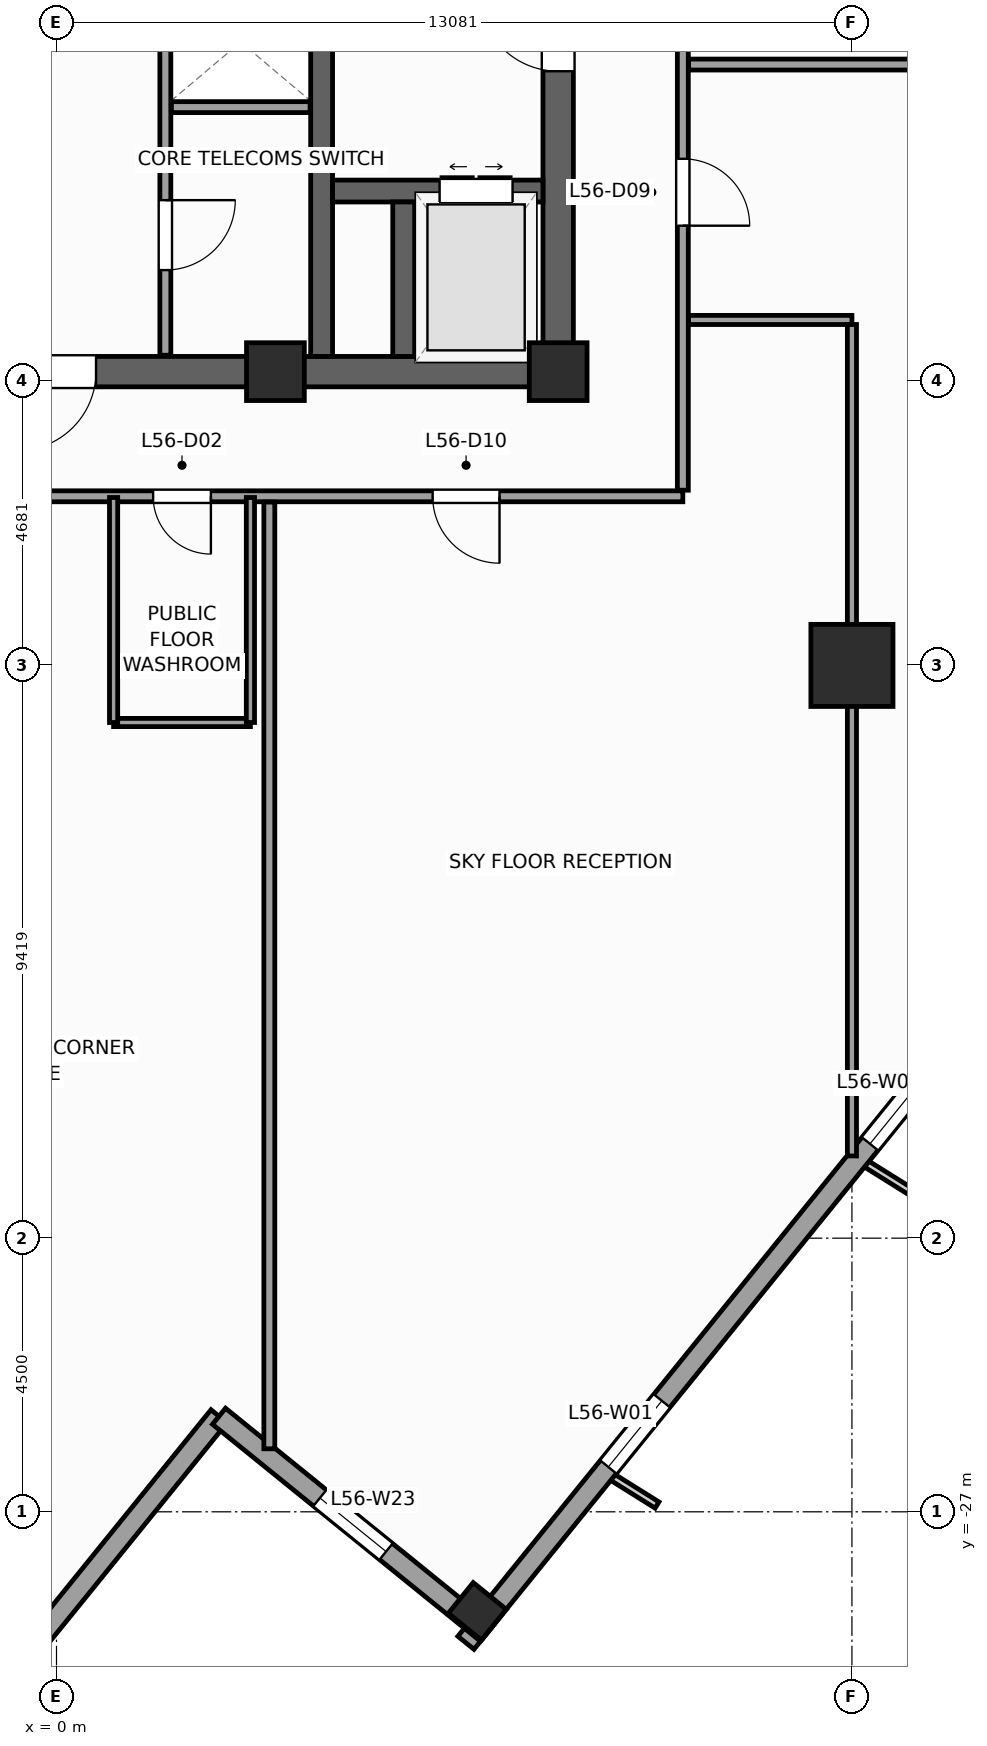
"""IFC4 building model, lengths in metres.
Left out: names, types, materials, properties, quantities, classifications, styles, units other than length and angle.
Written with IfcOpenShell. Run it as: python <this file> out.ifc"""

import sys

from ifc_helpers import new_model, si_unit, direction, frame, frame_2d, origin, origin_2d, place, context, subcontext, project, spatial, rectangle, extrude, source, transform, mapped, element, fill, save


model = new_model("IFC4")
c1 = context("Model", 3, precision=1e-05, world=origin(), true_north=direction((0.0, 1.0)))
c2 = subcontext(c1, "Body", "Model", "MODEL_VIEW")
j1 = project(units=[si_unit("LENGTHUNIT", "METRE"), si_unit("PLANEANGLEUNIT", "RADIAN")], contexts=[c1])
p1 = place(None, origin())
s1 = spatial("IfcSite", under=j1, at=p1, CompositionType="ELEMENT")
p2 = place(p1, origin())
s2 = spatial("IfcBuilding", under=s1, at=p2, CompositionType="ELEMENT")
p3 = place(p2, frame((0.0, 0.0, 232.9)))
s3 = spatial("IfcBuildingStorey", under=s2, at=p3, CompositionType="ELEMENT", Elevation=232.9)
p4 = place(p3, frame((-8.5, -8.25, 0.0), z_axis=(0.0, 0.0, 1.0), x_axis=(1.0, 0.0, 0.0)))
e1 = element("IfcWall", 1, at=p4, inside=s3, PredefinedType="SHEAR", context=c2, shape_type="SweptSolid", body=[
    extrude(rectangle(XDim=17.0, YDim=0.5, at=frame_2d((8.5, 0.0))), origin(), (0.0, 0.0, 1.0), 3.9),
])
p5 = place(p4, frame((7.85, 0.0, 0.0)))
e2 = element("IfcOpeningElement", 2, at=p5, cuts=e1, PredefinedType="OPENING", context=c2, shape_type="SweptSolid", body=[
    extrude(rectangle(XDim=1.3, YDim=2.2, at=frame_2d((0.65, 1.1))), frame((0.0, 0.26, 0.0), z_axis=(0.0, -1.0, 0.0), x_axis=(1.0, 0.0, 0.0)), (0.0, 0.0, 1.0), 0.52),
])
p6 = place(p3, frame((8.25, -8.0, 0.0), z_axis=(0.0, 0.0, 1.0), x_axis=(0.0, 1.0, 0.0)))
e3 = element("IfcWall", 3, at=p6, inside=s3, PredefinedType="SHEAR", context=c2, shape_type="SweptSolid", body=[
    extrude(rectangle(XDim=16.0, YDim=0.5, at=frame_2d((8.0, 0.0))), origin(), (0.0, 0.0, 1.0), 3.9),
])
p7 = place(p6, frame((4.69, 0.0, 0.0)))
e4 = element("IfcOpeningElement", 4, at=p7, cuts=e3, PredefinedType="OPENING", context=c2, shape_type="SweptSolid", body=[
    extrude(rectangle(XDim=1.3, YDim=2.2, at=frame_2d((0.65, 1.1))), frame((0.0, 0.26, 0.0), z_axis=(0.0, -1.0, 0.0), x_axis=(1.0, 0.0, 0.0)), (0.0, 0.0, 1.0), 0.52),
])
p8 = place(p3, frame((4.36, -8.0, 0.0), z_axis=(0.0, 0.0, 1.0), x_axis=(0.0, 1.0, 0.0)))
e5 = element("IfcWall", 5, at=p8, inside=s3, PredefinedType="SHEAR", context=c2, shape_type="SweptSolid", body=[
    extrude(rectangle(XDim=16.0, YDim=0.36, at=frame_2d((8.0, 0.0))), origin(), (0.0, 0.0, 1.0), 3.9),
])
p9 = place(p3, frame((4.54, -5.28, 0.0), z_axis=(0.0, 0.0, 1.0), x_axis=(1.0, 0.0, 0.0)))
e6 = element("IfcWall", 6, at=p9, inside=s3, PredefinedType="SHEAR", context=c2, shape_type="SweptSolid", body=[
    extrude(rectangle(XDim=3.46, YDim=0.36, at=frame_2d((1.73, 0.0))), origin(), (0.0, 0.0, 1.0), 3.9),
])
p10 = place(p9, frame((1.76, 0.0, 0.0)))
e7 = element("IfcOpeningElement", 7, at=p10, cuts=e6, PredefinedType="OPENING", context=c2, shape_type="SweptSolid", body=[
    extrude(rectangle(XDim=1.2, YDim=2.25, at=frame_2d((0.6, 1.125))), frame((0.0, 0.19, 0.0), z_axis=(0.0, -1.0, 0.0), x_axis=(1.0, 0.0, 0.0)), (0.0, 0.0, 1.0), 0.38),
])
p11 = place(p3, frame((5.71, -8.0, 0.0), z_axis=(0.0, 0.0, 1.0), x_axis=(0.0, 1.0, 0.0)))
e8 = element("IfcWall", 8, at=p11, inside=s3, PredefinedType="SHEAR", context=c2, shape_type="SweptSolid", body=[
    extrude(rectangle(XDim=2.54, YDim=0.36, at=frame_2d((1.27, 0.0))), origin(), (0.0, 0.0, 1.0), 3.9),
])
m1 = source(origin(), c2, "Body", "SweptSolid", [
    extrude(rectangle(XDim=0.95, YDim=0.95, at=origin_2d()), origin(), (0.0, 0.0, 1.0), 3.9),
])
for number, where, z_axis, x_axis in (
    (9, (8.25, -8.25, 0.0), (0.0, 0.0, 1.0), (1.0, 0.0, 0.0)),
    (10, (3.6, -8.25, 0.0), (0.0, 0.0, 1.0), (1.0, 0.0, 0.0)),
):
    element("IfcColumn", number, at=place(p3, frame(where, z_axis=z_axis, x_axis=x_axis)), inside=s3, PredefinedType="PILASTER", context=c2, shape_type="MappedRepresentation", body=[
        mapped(m1, transform((0.0, 0.0, 0.0), scale=1.0)),
    ])
m2 = source(origin(), c2, "Body", "SweptSolid", [
    extrude(rectangle(XDim=1.35, YDim=1.35, at=origin_2d()), origin(), (0.0, 0.0, 1.0), 3.9),
])
p12 = place(p3, frame((13.081, -13.081, 0.0), z_axis=(0.0, 0.0, 1.0), x_axis=(1.0, 0.0, 0.0)))
e11 = element("IfcColumn", 11, at=p12, inside=s3, PredefinedType="COLUMN", context=c2, shape_type="MappedRepresentation", body=[
    mapped(m2, transform((0.0, 0.0, 0.0), scale=1.0)),
])
m3 = source(origin(), c2, "Body", "SweptSolid", [
    extrude(rectangle(XDim=0.65, YDim=0.7, at=origin_2d()), origin(), (0.0, 0.0, 1.0), 3.9),
])
p13 = place(p3, frame((6.92, -28.637, 0.0), z_axis=(0.0, 0.0, 1.0), x_axis=(0.62932039105, 0.777145961457, 0.0)))
e12 = element("IfcColumn", 12, at=p13, inside=s3, PredefinedType="COLUMN", context=c2, shape_type="MappedRepresentation", body=[
    mapped(m3, transform((0.0, 0.0, 0.0), scale=1.0)),
])
p14 = place(p3, frame((6.733, -29.154, 0.0), z_axis=(0.0, 0.0, 1.0), x_axis=(0.629325378072, 0.77714192302, 0.0)))
e13 = element("IfcWall", 13, at=p14, inside=s3, PredefinedType="STANDARD", context=c2, shape_type="SweptSolid", body=[
    extrude(rectangle(XDim=36.84, YDim=0.34, at=frame_2d((18.42, 0.0))), origin(), (0.0, 0.0, 1.0), 2.96),
])
p15 = place(p14, frame((23.495, 0.0, 0.0)))
e14 = element("IfcOpeningElement", 14, at=p15, cuts=e13, PredefinedType="OPENING", context=c2, shape_type="SweptSolid", body=[
    extrude(rectangle(XDim=1.05, YDim=2.25, at=frame_2d((0.525, 1.125))), frame((0.0, 0.18, 0.0), z_axis=(0.0, -1.0, 0.0), x_axis=(1.0, 0.0, 0.0)), (0.0, 0.0, 1.0), 0.36),
])
p16 = place(p14, frame((3.721, 0.0, 0.48)))
e15 = element("IfcOpeningElement", 15, at=p16, cuts=e13, PredefinedType="OPENING", context=c2, shape_type="SweptSolid", body=[
    extrude(rectangle(XDim=1.4, YDim=2.4, at=frame_2d((0.7, 1.2))), frame((0.0, 0.18, 0.0), z_axis=(0.0, -1.0, 0.0), x_axis=(1.0, 0.0, 0.0)), (0.0, 0.0, 1.0), 0.36),
])
p17 = place(p14, frame((10.559, 0.0, 0.58)))
e16 = element("IfcOpeningElement", 16, at=p17, cuts=e13, PredefinedType="OPENING", context=c2, shape_type="SweptSolid", body=[
    extrude(rectangle(XDim=1.75, YDim=2.3, at=frame_2d((0.875, 1.15))), frame((0.0, 0.18, 0.0), z_axis=(0.0, -1.0, 0.0), x_axis=(1.0, 0.0, 0.0)), (0.0, 0.0, 1.0), 0.36),
])
p18 = place(p14, frame((16.058, 0.0, 0.58)))
e17 = element("IfcOpeningElement", 17, at=p18, cuts=e13, PredefinedType="OPENING", context=c2, shape_type="SweptSolid", body=[
    extrude(rectangle(XDim=1.75, YDim=2.3, at=frame_2d((0.875, 1.15))), frame((0.0, 0.18, 0.0), z_axis=(0.0, -1.0, 0.0), x_axis=(1.0, 0.0, 0.0)), (0.0, 0.0, 1.0), 0.36),
])
p19 = place(p14, frame((25.676, 0.0, 0.58)))
e18 = element("IfcOpeningElement", 18, at=p19, cuts=e13, PredefinedType="OPENING", context=c2, shape_type="SweptSolid", body=[
    extrude(rectangle(XDim=1.75, YDim=2.3, at=frame_2d((0.875, 1.15))), frame((0.0, 0.18, 0.0), z_axis=(0.0, -1.0, 0.0), x_axis=(1.0, 0.0, 0.0)), (0.0, 0.0, 1.0), 0.36),
])
p20 = place(p14, frame((30.982, 0.0, 0.48)))
e19 = element("IfcOpeningElement", 19, at=p20, cuts=e13, PredefinedType="OPENING", context=c2, shape_type="SweptSolid", body=[
    extrude(rectangle(XDim=1.4, YDim=2.4, at=frame_2d((0.7, 1.2))), frame((0.0, 0.18, 0.0), z_axis=(0.0, -1.0, 0.0), x_axis=(1.0, 0.0, 0.0)), (0.0, 0.0, 1.0), 0.36),
])
p21 = place(p3, frame((-0.789, -29.703, 0.0), z_axis=(0.0, 0.0, 1.0), x_axis=(0.629323365087, 0.77714355312, 0.0)))
e20 = element("IfcWall", 20, at=p21, inside=s3, PredefinedType="STANDARD", context=c2, shape_type="SweptSolid", body=[
    extrude(rectangle(XDim=5.5, YDim=0.34, at=frame_2d((2.75, 0.0))), origin(), (0.0, 0.0, 1.0), 3.66),
])
p22 = place(p3, frame((2.673, -25.429, 0.0), z_axis=(0.0, 0.0, 1.0), x_axis=(0.777162640055, -0.629299794138, 0.0)))
e21 = element("IfcWall", 21, at=p22, inside=s3, PredefinedType="STANDARD", context=c2, shape_type="SweptSolid", body=[
    extrude(rectangle(XDim=5.67, YDim=0.34, at=frame_2d((2.835, 0.0))), origin(), (0.0, 0.0, 1.0), 3.66),
])
p23 = place(p22, frame((2.135, 0.0, 0.48)))
e22 = element("IfcOpeningElement", 22, at=p23, cuts=e21, PredefinedType="OPENING", context=c2, shape_type="SweptSolid", body=[
    extrude(rectangle(XDim=1.4, YDim=2.4, at=frame_2d((0.7, 1.2))), frame((0.0, 0.18, 0.0), z_axis=(0.0, -1.0, 0.0), x_axis=(1.0, 0.0, 0.0)), (0.0, 0.0, 1.0), 0.36),
])
p24 = place(p3, frame((1.79, -7.98, 0.0), z_axis=(0.0, 0.0, 1.0), x_axis=(0.0, 1.0, 0.0)))
e23 = element("IfcWall", 23, at=p24, inside=s3, PredefinedType="PARTITIONING", context=c2, shape_type="SweptSolid", body=[
    extrude(rectangle(XDim=12.38, YDim=0.18, at=frame_2d((6.19, 0.0))), origin(), (0.0, 0.0, 1.0), 3.66),
])
p25 = place(p24, frame((8.8, 0.0, 0.0)))
e24 = element("IfcOpeningElement", 24, at=p25, cuts=e23, PredefinedType="OPENING", context=c2, shape_type="SweptSolid", body=[
    extrude(rectangle(XDim=1.1, YDim=2.2, at=frame_2d((0.55, 1.1))), frame((0.0, 0.1, 0.0), z_axis=(0.0, -1.0, 0.0), x_axis=(1.0, 0.0, 0.0)), (0.0, 0.0, 1.0), 0.2),
])
p26 = place(p24, frame((10.86, 0.0, 0.0)))
e25 = element("IfcOpeningElement", 25, at=p26, cuts=e23, PredefinedType="OPENING", context=c2, shape_type="SweptSolid", body=[
    extrude(rectangle(XDim=1.1, YDim=2.2, at=frame_2d((0.55, 1.1))), frame((0.0, 0.1, 0.0), z_axis=(0.0, -1.0, 0.0), x_axis=(1.0, 0.0, 0.0)), (0.0, 0.0, 1.0), 0.2),
])
p27 = place(p24, frame((1.4, 0.0, 0.0)))
e26 = element("IfcOpeningElement", 26, at=p27, cuts=e23, PredefinedType="OPENING", context=c2, shape_type="SweptSolid", body=[
    extrude(rectangle(XDim=1.15, YDim=2.25, at=frame_2d((0.575, 1.125))), frame((0.0, 0.1, 0.0), z_axis=(0.0, -1.0, 0.0), x_axis=(1.0, 0.0, 0.0)), (0.0, 0.0, 1.0), 0.2),
])
p28 = place(p3, frame((1.89, -3.9, 0.0), z_axis=(0.0, 0.0, 1.0), x_axis=(1.0, 0.0, 0.0)))
e27 = element("IfcWall", 27, at=p28, inside=s3, PredefinedType="PARTITIONING", context=c2, shape_type="SweptSolid", body=[
    extrude(rectangle(XDim=2.28, YDim=0.18, at=frame_2d((1.14, 0.0))), origin(), (0.0, 0.0, 1.0), 3.66),
])
p29 = place(p3, frame((-11.4, -10.3, 0.0), z_axis=(0.0, 0.0, 1.0), x_axis=(1.0, 0.0, 0.0)))
e28 = element("IfcWall", 28, at=p29, inside=s3, PredefinedType="PARTITIONING", context=c2, shape_type="SweptSolid", body=[
    extrude(rectangle(XDim=21.7, YDim=0.18, at=frame_2d((10.85, 0.0))), origin(), (0.0, 0.0, 1.0), 3.66),
])
p30 = place(p29, frame((12.989, 0.0, 0.0)))
e29 = element("IfcOpeningElement", 29, at=p30, cuts=e28, PredefinedType="OPENING", context=c2, shape_type="SweptSolid", body=[
    extrude(rectangle(XDim=0.95, YDim=2.1, at=frame_2d((0.475, 1.05))), frame((0.0, 0.1, 0.0), z_axis=(0.0, -1.0, 0.0), x_axis=(1.0, 0.0, 0.0)), (0.0, 0.0, 1.0), 0.2),
])
p31 = place(p29, frame((17.585, 0.0, 0.0)))
e30 = element("IfcOpeningElement", 30, at=p31, cuts=e28, PredefinedType="OPENING", context=c2, shape_type="SweptSolid", body=[
    extrude(rectangle(XDim=1.1, YDim=2.2, at=frame_2d((0.55, 1.1))), frame((0.0, 0.1, 0.0), z_axis=(0.0, -1.0, 0.0), x_axis=(1.0, 0.0, 0.0)), (0.0, 0.0, 1.0), 0.2),
])
p32 = place(p29, frame((9.075, 0.0, 0.0)))
e31 = element("IfcOpeningElement", 31, at=p32, cuts=e28, PredefinedType="OPENING", context=c2, shape_type="SweptSolid", body=[
    extrude(rectangle(XDim=1.1, YDim=2.2, at=frame_2d((0.55, 1.1))), frame((0.0, 0.1, 0.0), z_axis=(0.0, -1.0, 0.0), x_axis=(1.0, 0.0, 0.0)), (0.0, 0.0, 1.0), 0.2),
])
p33 = place(p29, frame((3.724, 0.0, 0.0)))
e32 = element("IfcOpeningElement", 32, at=p33, cuts=e28, PredefinedType="OPENING", context=c2, shape_type="SweptSolid", body=[
    extrude(rectangle(XDim=1.1, YDim=2.2, at=frame_2d((0.55, 1.1))), frame((0.0, 0.1, 0.0), z_axis=(0.0, -1.0, 0.0), x_axis=(1.0, 0.0, 0.0)), (0.0, 0.0, 1.0), 0.2),
])
p34 = place(p3, frame((10.3, -10.2, 0.0), z_axis=(0.0, 0.0, 1.0), x_axis=(0.0, 1.0, 0.0)))
e33 = element("IfcWall", 33, at=p34, inside=s3, PredefinedType="PARTITIONING", context=c2, shape_type="SweptSolid", body=[
    extrude(rectangle(XDim=20.4, YDim=0.18, at=frame_2d((10.2, 0.0))), origin(), (0.0, 0.0, 1.0), 3.66),
])
p35 = place(p34, frame((14.95, 0.0, 0.0)))
e34 = element("IfcOpeningElement", 34, at=p35, cuts=e33, PredefinedType="OPENING", context=c2, shape_type="SweptSolid", body=[
    extrude(rectangle(XDim=1.1, YDim=2.2, at=frame_2d((0.55, 1.1))), frame((0.0, 0.1, 0.0), z_axis=(0.0, -1.0, 0.0), x_axis=(1.0, 0.0, 0.0)), (0.0, 0.0, 1.0), 0.2),
])
p36 = place(p34, frame((9.65, 0.0, 0.0)))
e35 = element("IfcOpeningElement", 35, at=p36, cuts=e33, PredefinedType="OPENING", context=c2, shape_type="SweptSolid", body=[
    extrude(rectangle(XDim=1.1, YDim=2.2, at=frame_2d((0.55, 1.1))), frame((0.0, 0.1, 0.0), z_axis=(0.0, -1.0, 0.0), x_axis=(1.0, 0.0, 0.0)), (0.0, 0.0, 1.0), 0.2),
])
p37 = place(p34, frame((4.35, 0.0, 0.0)))
e36 = element("IfcOpeningElement", 36, at=p37, cuts=e33, PredefinedType="OPENING", context=c2, shape_type="SweptSolid", body=[
    extrude(rectangle(XDim=1.1, YDim=2.2, at=frame_2d((0.55, 1.1))), frame((0.0, 0.1, 0.0), z_axis=(0.0, -1.0, 0.0), x_axis=(1.0, 0.0, 0.0)), (0.0, 0.0, 1.0), 0.2),
])
p38 = place(p3, frame((10.395, -3.2, 0.0), z_axis=(0.0, 0.0, 1.0), x_axis=(1.0, 0.0, 0.0)))
e37 = element("IfcWall", 37, at=p38, inside=s3, PredefinedType="PARTITIONING", context=c2, shape_type="SweptSolid", body=[
    extrude(rectangle(XDim=17.22, YDim=0.18, at=frame_2d((8.61, 0.0))), origin(), (0.0, 0.0, 1.0), 3.66),
])
p39 = place(p3, frame((3.5, -10.395, 0.0), z_axis=(0.0, 0.0, 1.0), x_axis=(0.0, -1.0, 0.0)))
e38 = element("IfcWall", 38, at=p39, inside=s3, PredefinedType="PARTITIONING", context=c2, shape_type="SweptSolid", body=[
    extrude(rectangle(XDim=15.569, YDim=0.18, at=frame_2d((7.784, 0.0))), origin(), (0.0, 0.0, 1.0), 3.66),
])
p40 = place(p3, frame((10.395, -7.4, 0.0), z_axis=(0.0, 0.0, 1.0), x_axis=(1.0, 0.0, 0.0)))
e39 = element("IfcWall", 39, at=p40, inside=s3, PredefinedType="PARTITIONING", context=c2, shape_type="SweptSolid", body=[
    extrude(rectangle(XDim=2.686, YDim=0.15, at=frame_2d((1.343, 0.0))), origin(), (0.0, 0.0, 1.0), 3.66),
])
p41 = place(p3, frame((13.081, -7.475, 0.0), z_axis=(0.0, 0.0, 1.0), x_axis=(0.0, -1.0, 0.0)))
e40 = element("IfcWall", 40, at=p41, inside=s3, PredefinedType="PARTITIONING", context=c2, shape_type="SweptSolid", body=[
    extrude(rectangle(XDim=13.673, YDim=0.15, at=frame_2d((6.837, 0.0))), origin(), (0.0, 0.0, 1.0), 2.76),
])
p42 = place(p3, frame((0.939, -14.02, 0.0), z_axis=(0.0, 0.0, 1.0), x_axis=(1.0, 0.0, 0.0)))
e41 = element("IfcWall", 41, at=p42, inside=s3, PredefinedType="PARTITIONING", context=c2, shape_type="SweptSolid", body=[
    extrude(rectangle(XDim=2.25, YDim=0.135, at=frame_2d((1.125, 0.0))), origin(), (0.0, 0.0, 1.0), 3.66),
])
for number, where, z_axis, x_axis in (
    (42, (3.189, -14.02, 0.0), (0.0, 0.0, 1.0), (0.0, 1.0, 0.0)),
    (43, (0.939, -14.02, 0.0), (0.0, 0.0, 1.0), (0.0, 1.0, 0.0)),
):
    element("IfcWall", number, at=place(p3, frame(where, z_axis=z_axis, x_axis=x_axis)), inside=s3, PredefinedType="PARTITIONING", context=c2, shape_type="SweptSolid", body=[
        extrude(rectangle(XDim=3.7, YDim=0.135, at=frame_2d((1.85, 0.0))), origin(), (0.0, 0.0, 1.0), 3.66),
    ])
m4 = source(origin(), c2, "Body", "SweptSolid", [
    extrude(rectangle(XDim=1.4, YDim=2.4, at=frame_2d((0.7, 1.2))), frame((0.0, 0.03, 0.0), z_axis=(0.0, -1.0, 0.0), x_axis=(1.0, 0.0, 0.0)), (0.0, 0.0, 1.0), 0.06),
])
p43 = place(p16, origin())
e44 = element("IfcWindow", 44, at=p43, inside=s3, PartitioningType="SINGLE_PANEL", PredefinedType="WINDOW", context=c2, shape_type="MappedRepresentation", body=[
    mapped(m4, transform((0.0, 0.0, 0.0), scale=1.0)),
])
fill(e15, e44)
m5 = source(origin(), c2, "Body", "SweptSolid", [
    extrude(rectangle(XDim=1.75, YDim=2.3, at=frame_2d((0.875, 1.15))), frame((0.0, 0.03, 0.0), z_axis=(0.0, -1.0, 0.0), x_axis=(1.0, 0.0, 0.0)), (0.0, 0.0, 1.0), 0.06),
])
p44 = place(p17, origin())
e45 = element("IfcWindow", 45, at=p44, inside=s3, PartitioningType="SINGLE_PANEL", PredefinedType="WINDOW", context=c2, shape_type="MappedRepresentation", body=[
    mapped(m5, transform((0.0, 0.0, 0.0), scale=1.0)),
])
fill(e16, e45)
p45 = place(p23, origin())
e46 = element("IfcWindow", 46, at=p45, inside=s3, PartitioningType="SINGLE_PANEL", PredefinedType="WINDOW", context=c2, shape_type="MappedRepresentation", body=[
    mapped(m4, transform((0.0, 0.0, 0.0), scale=1.0)),
])
fill(e22, e46)
m6 = source(origin(), c2, "Body", "SweptSolid", [
    extrude(rectangle(XDim=1.3, YDim=2.2, at=frame_2d((0.65, 1.1))), frame((0.0, 0.025, 0.0), z_axis=(0.0, -1.0, 0.0), x_axis=(1.0, 0.0, 0.0)), (0.0, 0.0, 1.0), 0.05),
])
p46 = place(p7, origin())
e47 = element("IfcDoor", 47, at=p46, inside=s3, OperationType="SINGLE_SWING_RIGHT", PredefinedType="DOOR", context=c2, shape_type="MappedRepresentation", body=[
    mapped(m6, transform((0.0, 0.0, 0.0), scale=1.0)),
])
fill(e4, e47)
p47 = place(p5, frame((1.3, 0.0, 0.0), z_axis=(0.0, 0.0, 1.0), x_axis=(-1.0, 0.0, 0.0)))
e48 = element("IfcDoor", 48, at=p47, inside=s3, OperationType="SINGLE_SWING_LEFT", PredefinedType="DOOR", context=c2, shape_type="MappedRepresentation", body=[
    mapped(m6, transform((0.0, 0.0, 0.0), scale=1.0)),
])
fill(e2, e48)
m7 = source(origin(), c2, "Body", "SweptSolid", [
    extrude(rectangle(XDim=1.2, YDim=2.25, at=frame_2d((0.6, 1.125))), frame((0.0, 0.025, 0.0), z_axis=(0.0, -1.0, 0.0), x_axis=(1.0, 0.0, 0.0)), (0.0, 0.0, 1.0), 0.05),
])
p48 = place(p10, origin())
e49 = element("IfcDoor", 49, at=p48, inside=s3, OperationType="DOUBLE_DOOR_SLIDING", PredefinedType="DOOR", context=c2, shape_type="MappedRepresentation", body=[
    mapped(m7, transform((0.0, 0.0, 0.0), scale=1.0)),
])
fill(e7, e49)
m8 = source(origin(), c2, "Body", "SweptSolid", [
    extrude(rectangle(XDim=1.15, YDim=2.25, at=frame_2d((0.575, 1.125))), frame((0.0, 0.025, 0.0), z_axis=(0.0, -1.0, 0.0), x_axis=(1.0, 0.0, 0.0)), (0.0, 0.0, 1.0), 0.05),
])
p49 = place(p27, frame((1.15, 0.0, 0.0), z_axis=(0.0, 0.0, 1.0), x_axis=(-1.0, 0.0, 0.0)))
e50 = element("IfcDoor", 50, at=p49, inside=s3, OperationType="SINGLE_SWING_RIGHT", PredefinedType="DOOR", context=c2, shape_type="MappedRepresentation", body=[
    mapped(m8, transform((0.0, 0.0, 0.0), scale=1.0)),
])
fill(e26, e50)
m9 = source(origin(), c2, "Body", "SweptSolid", [
    extrude(rectangle(XDim=0.95, YDim=2.1, at=frame_2d((0.475, 1.05))), frame((0.0, 0.025, 0.0), z_axis=(0.0, -1.0, 0.0), x_axis=(1.0, 0.0, 0.0)), (0.0, 0.0, 1.0), 0.05),
])
p50 = place(p30, frame((0.95, 0.0, 0.0), z_axis=(0.0, 0.0, 1.0), x_axis=(-1.0, 0.0, 0.0)))
e51 = element("IfcDoor", 51, at=p50, inside=s3, OperationType="SINGLE_SWING_RIGHT", PredefinedType="DOOR", context=c2, shape_type="MappedRepresentation", body=[
    mapped(m9, transform((0.0, 0.0, 0.0), scale=1.0)),
])
fill(e29, e51)
m10 = source(origin(), c2, "Body", "SweptSolid", [
    extrude(rectangle(XDim=1.1, YDim=2.2, at=frame_2d((0.55, 1.1))), frame((0.0, 0.025, 0.0), z_axis=(0.0, -1.0, 0.0), x_axis=(1.0, 0.0, 0.0)), (0.0, 0.0, 1.0), 0.05),
])
p51 = place(p37, frame((1.1, 0.0, 0.0), z_axis=(0.0, 0.0, 1.0), x_axis=(-1.0, 0.0, 0.0)))
e52 = element("IfcDoor", 52, at=p51, inside=s3, OperationType="SINGLE_SWING_LEFT", PredefinedType="DOOR", context=c2, shape_type="MappedRepresentation", body=[
    mapped(m10, transform((0.0, 0.0, 0.0), scale=1.0)),
])
fill(e36, e52)
p52 = place(p31, frame((1.1, 0.0, 0.0), z_axis=(0.0, 0.0, 1.0), x_axis=(-1.0, 0.0, 0.0)))
e53 = element("IfcDoor", 53, at=p52, inside=s3, OperationType="SINGLE_SWING_RIGHT", PredefinedType="DOOR", context=c2, shape_type="MappedRepresentation", body=[
    mapped(m10, transform((0.0, 0.0, 0.0), scale=1.0)),
])
fill(e30, e53)
save(model, sys.argv[1])
